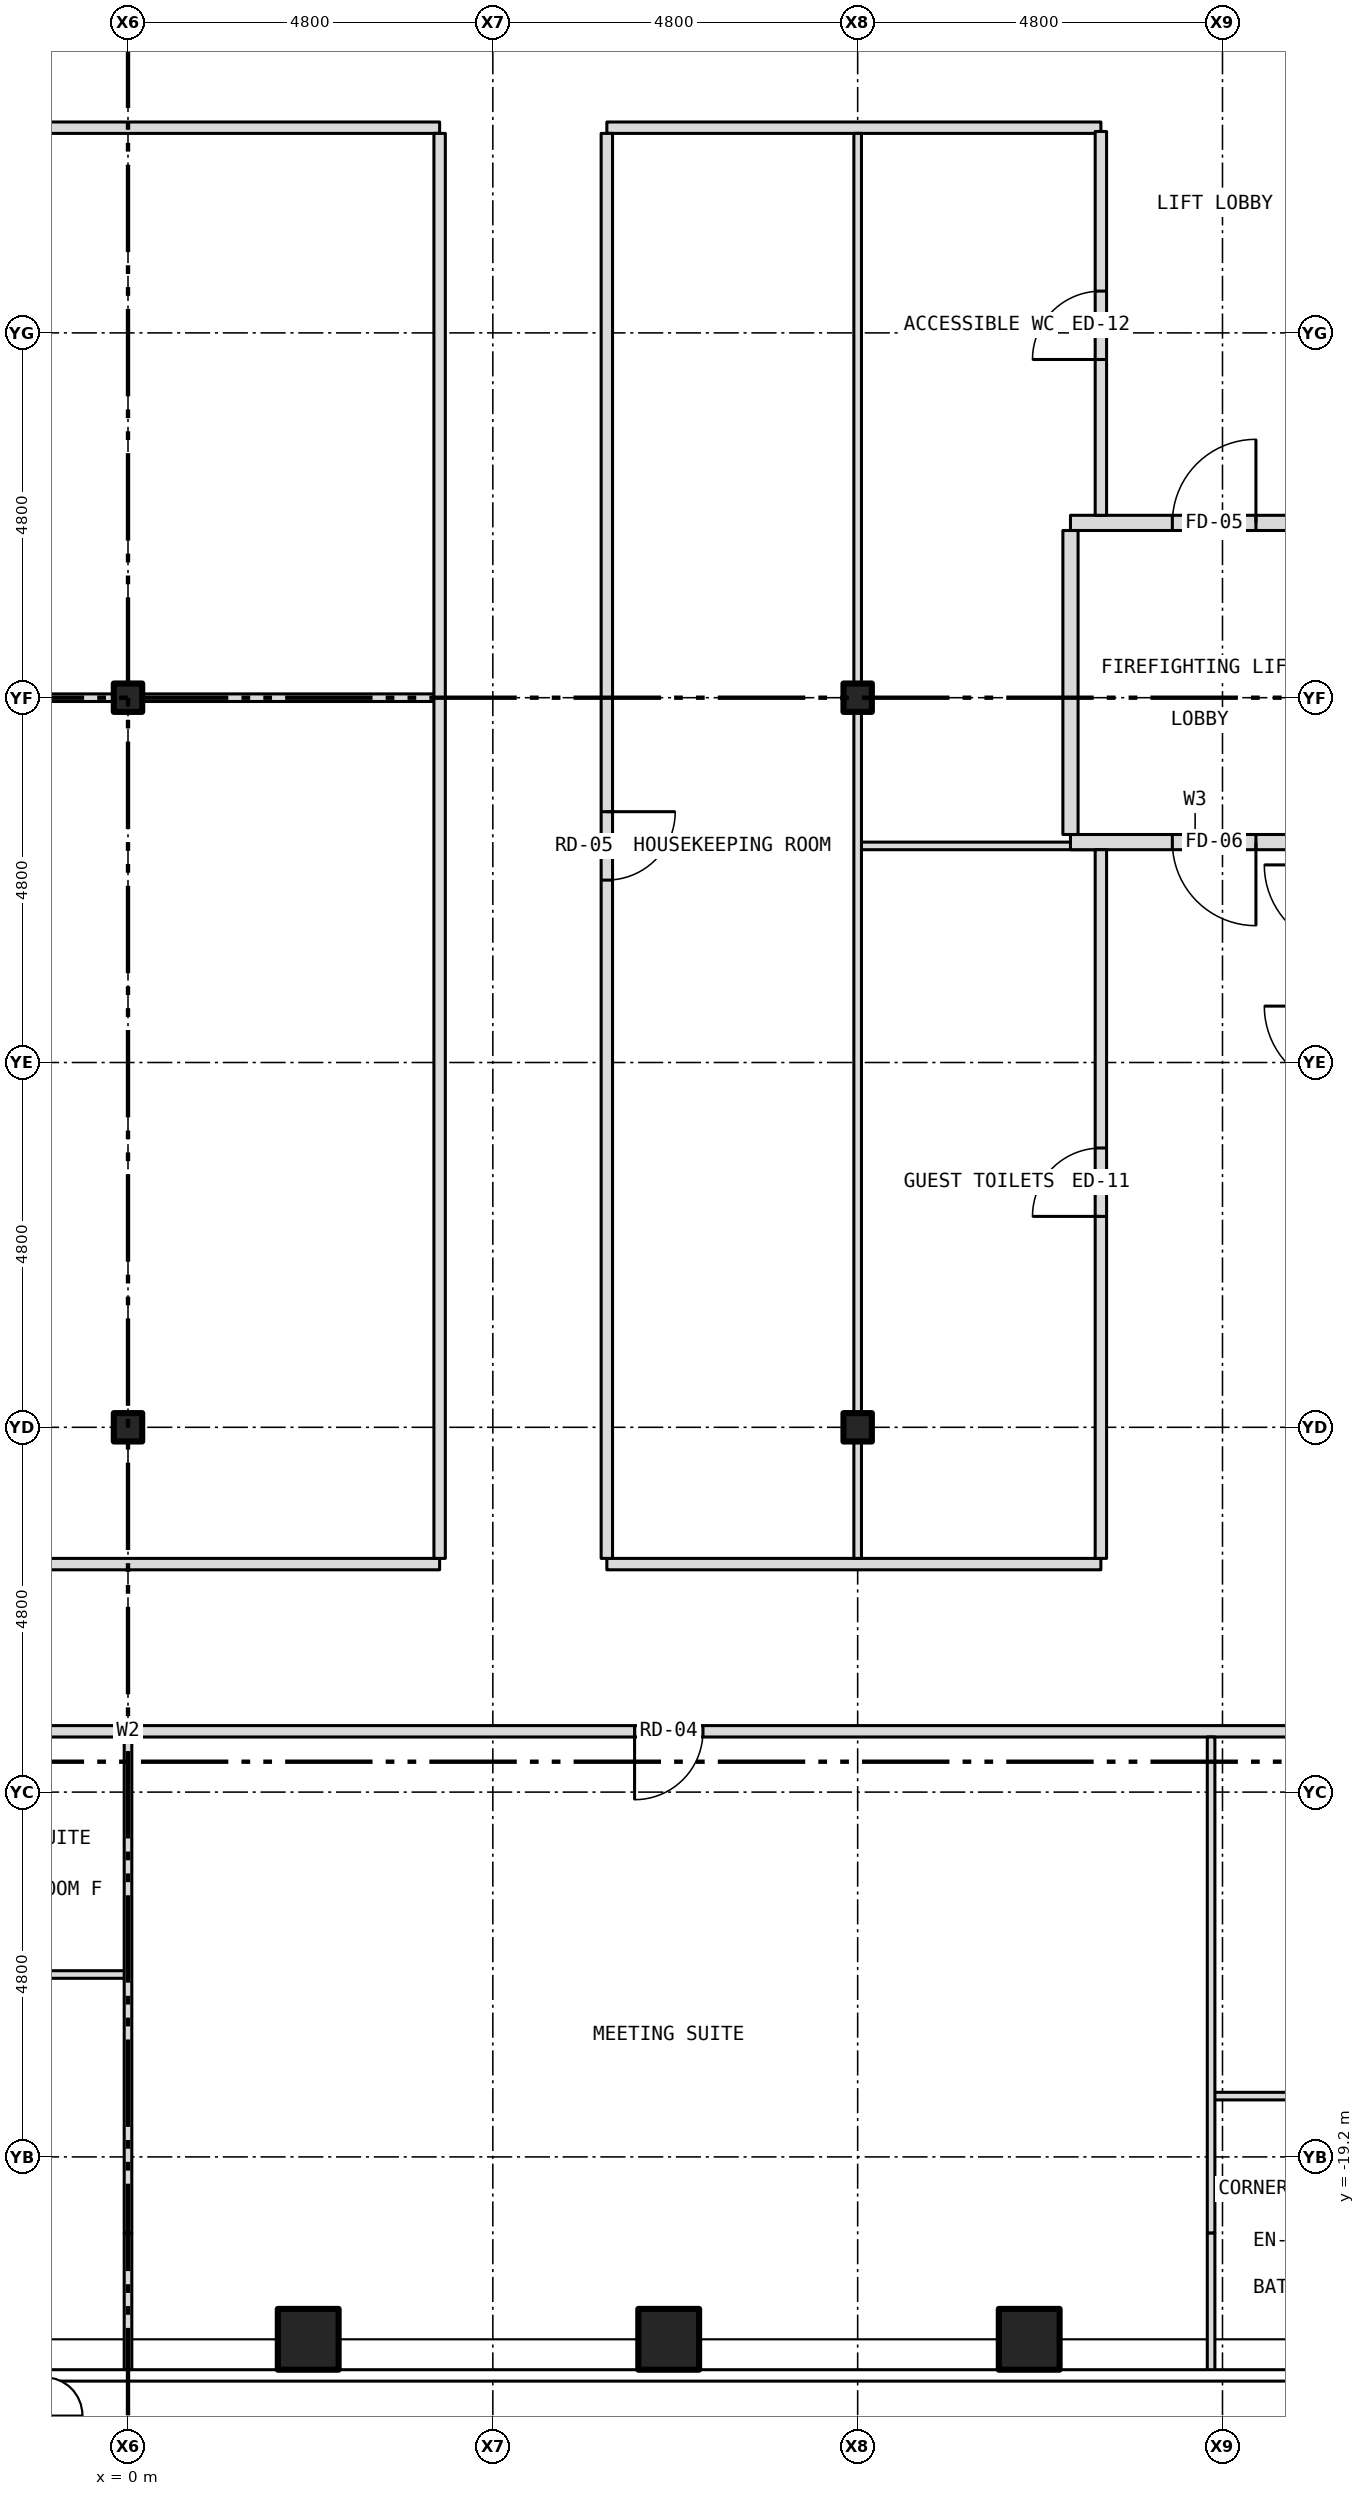
"""IFC4 building model, lengths in metres.
Left out: names, types, materials, properties, quantities, classifications, styles, units other than length and angle.
Written with IfcOpenShell. Run it as: python <this file> out.ifc"""

import sys

from ifc_helpers import new_model, si_unit, direction, frame, frame_2d, origin, origin_2d, place, context, subcontext, project, spatial, rectangle, hollow_rectangle, i_section, extrude, element, fill, save


model = new_model("IFC4")
c1 = context("Model", 3, precision=1e-05, world=origin(), true_north=direction((0.0, 1.0)))
c2 = subcontext(c1, "Body", "Model", "MODEL_VIEW")
j1 = project(units=[si_unit("LENGTHUNIT", "METRE"), si_unit("PLANEANGLEUNIT", "RADIAN")], contexts=[c1])
p1 = place(None, origin())
s1 = spatial("IfcSite", under=j1, at=p1, CompositionType="ELEMENT")
p2 = place(p1, origin())
s2 = spatial("IfcBuilding", under=s1, at=p2, CompositionType="ELEMENT")
p3 = place(p2, frame((0.0, 0.0, 183.0)))
s3 = spatial("IfcBuildingStorey", under=s2, at=p3, CompositionType="ELEMENT", Elevation=183.0)
for number, where, z_axis, x_axis in (
    (1, (2.371, -21.6, -0.15), (0.0, 0.0, 1.0), (1.0, 0.0, 0.0)),
    (2, (7.114, -21.6, -0.15), (0.0, 0.0, 1.0), (1.0, 0.0, 0.0)),
    (3, (11.857, -21.6, -0.15), (0.0, 0.0, 1.0), (1.0, 0.0, 0.0)),
):
    element("IfcColumn", number, at=place(p3, frame(where, z_axis=z_axis, x_axis=x_axis)), inside=s3, PredefinedType="COLUMN", context=c2, shape_type="SweptSolid", body=[
        extrude(hollow_rectangle(XDim=0.8, YDim=0.8, WallThickness=0.045, at=origin_2d()), origin(), (0.0, 0.0, 1.0), 3.35),
    ])
for number, where, z_axis, x_axis in (
    (4, (0.0, -9.6, -0.15), (0.0, 0.0, 1.0), (1.0, 0.0, 0.0)),
    (5, (0.0, 0.0, -0.15), (0.0, 0.0, 1.0), (1.0, 0.0, 0.0)),
    (6, (9.6, -9.6, -0.15), (0.0, 0.0, 1.0), (1.0, 0.0, 0.0)),
    (7, (9.6, 0.0, -0.15), (0.0, 0.0, 1.0), (1.0, 0.0, 0.0)),
):
    element("IfcColumn", number, at=place(p3, frame(where, z_axis=z_axis, x_axis=x_axis)), inside=s3, PredefinedType="COLUMN", context=c2, shape_type="SweptSolid", body=[
        extrude(i_section(OverallWidth=0.373, OverallDepth=0.373, WebThickness=0.016, FlangeThickness=0.026, at=origin_2d()), origin(), (0.0, 0.0, 1.0), 3.35),
    ])
p4 = place(p3, frame((14.25, -18.4, 0.0), z_axis=(0.0, 0.0, 1.0), x_axis=(1.0, 0.0, 0.0)))
e8 = element("IfcWall", 8, at=p4, inside=s3, PredefinedType="PARTITIONING", context=c2, shape_type="SweptSolid", body=[
    extrude(rectangle(XDim=2.78, YDim=0.1, at=frame_2d((1.39, 0.0))), origin(), (0.0, 0.0, 1.0), 3.2),
])
p5 = place(p4, frame((1.189, 0.0, 0.0)))
e9 = element("IfcOpeningElement", 9, at=p5, cuts=e8, PredefinedType="OPENING", context=c2, shape_type="SweptSolid", body=[
    extrude(rectangle(XDim=0.9, YDim=2.1, at=frame_2d((0.45, 1.05))), frame((0.0, 0.062, 0.0), z_axis=(0.0, -1.0, 0.0), x_axis=(1.0, 0.0, 0.0)), (0.0, 0.0, 1.0), 0.124),
])
p6 = place(p3, frame((-2.2, -16.8, 0.0), z_axis=(0.0, 0.0, 1.0), x_axis=(1.0, 0.0, 0.0)))
e10 = element("IfcWall", 10, at=p6, inside=s3, PredefinedType="PARTITIONING", context=c2, shape_type="SweptSolid", body=[
    extrude(rectangle(XDim=2.2, YDim=0.1, at=frame_2d((1.1, 0.0))), origin(), (0.0, 0.0, 1.0), 3.2),
])
p7 = place(p3, frame((-15.8, -13.6, 0.0), z_axis=(0.0, 0.0, 1.0), x_axis=(1.0, 0.0, 0.0)))
e11 = element("IfcWall", 11, at=p7, inside=s3, PredefinedType="PARTITIONING", context=c2, shape_type="SweptSolid", body=[
    extrude(rectangle(XDim=31.6, YDim=0.15, at=frame_2d((15.8, 0.0))), origin(), (0.0, 0.0, 1.0), 3.2),
])
p8 = place(p7, frame((3.529, 0.0, 0.0)))
e12 = element("IfcOpeningElement", 12, at=p8, cuts=e11, PredefinedType="OPENING", context=c2, shape_type="SweptSolid", body=[
    extrude(rectangle(XDim=1.0, YDim=2.1, at=frame_2d((0.5, 1.05))), frame((0.0, 0.087, 0.0), z_axis=(0.0, -1.0, 0.0), x_axis=(1.0, 0.0, 0.0)), (0.0, 0.0, 1.0), 0.174),
])
p9 = place(p7, frame((10.643, 0.0, 0.0)))
e13 = element("IfcOpeningElement", 13, at=p9, cuts=e11, PredefinedType="OPENING", context=c2, shape_type="SweptSolid", body=[
    extrude(rectangle(XDim=1.0, YDim=2.1, at=frame_2d((0.5, 1.05))), frame((0.0, 0.087, 0.0), z_axis=(0.0, -1.0, 0.0), x_axis=(1.0, 0.0, 0.0)), (0.0, 0.0, 1.0), 0.174),
])
p10 = place(p7, frame((22.465, 0.0, 0.0)))
e14 = element("IfcOpeningElement", 14, at=p10, cuts=e11, PredefinedType="OPENING", context=c2, shape_type="SweptSolid", body=[
    extrude(rectangle(XDim=0.9, YDim=2.1, at=frame_2d((0.45, 1.05))), frame((0.0, 0.087, 0.0), z_axis=(0.0, -1.0, 0.0), x_axis=(1.0, 0.0, 0.0)), (0.0, 0.0, 1.0), 0.174),
])
p11 = place(p3, frame((-12.8, -11.4, 0.0), z_axis=(0.0, 0.0, 1.0), x_axis=(1.0, 0.0, 0.0)))
e15 = element("IfcWall", 15, at=p11, inside=s3, PredefinedType="PARTITIONING", context=c2, shape_type="SweptSolid", body=[
    extrude(rectangle(XDim=16.9, YDim=0.15, at=frame_2d((8.45, 0.0))), origin(), (0.0, 0.0, 1.0), 3.2),
])
p12 = place(p11, frame((8.0, 0.0, 0.0)))
e16 = element("IfcOpeningElement", 16, at=p12, cuts=e15, PredefinedType="OPENING", context=c2, shape_type="SweptSolid", body=[
    extrude(rectangle(XDim=0.9, YDim=2.1, at=frame_2d((0.45, 1.05))), frame((0.0, 0.087, 0.0), z_axis=(0.0, -1.0, 0.0), x_axis=(1.0, 0.0, 0.0)), (0.0, 0.0, 1.0), 0.174),
])
p13 = place(p3, frame((6.3, -11.4, 0.0), z_axis=(0.0, 0.0, 1.0), x_axis=(1.0, 0.0, 0.0)))
e17 = element("IfcWall", 17, at=p13, inside=s3, PredefinedType="PARTITIONING", context=c2, shape_type="SweptSolid", body=[
    extrude(rectangle(XDim=6.5, YDim=0.15, at=frame_2d((3.25, 0.0))), origin(), (0.0, 0.0, 1.0), 3.2),
])
p14 = place(p3, frame((9.6, -1.95, 0.0), z_axis=(0.0, 0.0, 1.0), x_axis=(1.0, 0.0, 0.0)))
e18 = element("IfcWall", 18, at=p14, inside=s3, PredefinedType="PARTITIONING", context=c2, shape_type="SweptSolid", body=[
    extrude(rectangle(XDim=3.2, YDim=0.1, at=frame_2d((1.6, 0.0))), origin(), (0.0, 0.0, 1.0), 3.2),
])
p15 = place(p3, frame((12.4, -1.9, 0.0), z_axis=(0.0, 0.0, 1.0), x_axis=(1.0, 0.0, 0.0)))
e19 = element("IfcWall", 19, at=p15, inside=s3, PredefinedType="PARTITIONING", context=c2, shape_type="SweptSolid", body=[
    extrude(rectangle(XDim=3.28, YDim=0.2, at=frame_2d((1.64, 0.0))), origin(), (0.0, 0.0, 1.0), 3.2),
])
p16 = place(p15, frame((1.34, 0.0, 0.0)))
e20 = element("IfcOpeningElement", 20, at=p16, cuts=e19, PredefinedType="OPENING", context=c2, shape_type="SweptSolid", body=[
    extrude(rectangle(XDim=1.1, YDim=2.1, at=frame_2d((0.55, 1.05))), frame((0.0, 0.112, 0.0), z_axis=(0.0, -1.0, 0.0), x_axis=(1.0, 0.0, 0.0)), (0.0, 0.0, 1.0), 0.224),
])
p17 = place(p3, frame((-9.413, 0.0, 0.0), z_axis=(0.0, 0.0, 1.0), x_axis=(1.0, 0.0, 0.0)))
e21 = element("IfcWall", 21, at=p17, inside=s3, PredefinedType="PARTITIONING", context=c2, shape_type="SweptSolid", body=[
    extrude(rectangle(XDim=9.226, YDim=0.1, at=frame_2d((4.613, 0.0))), origin(), (0.0, 0.0, 1.0), 2.578),
])
p18 = place(p3, frame((-0.187, 0.0, 0.0), z_axis=(0.0, 0.0, 1.0), x_axis=(1.0, 0.0, 0.0)))
e22 = element("IfcWall", 22, at=p18, inside=s3, PredefinedType="PARTITIONING", context=c2, shape_type="SweptSolid", body=[
    extrude(rectangle(XDim=0.374, YDim=0.1, at=frame_2d((0.187, 0.0))), origin(), (0.0, 0.0, 1.0), 3.2),
])
p19 = place(p3, frame((0.187, 0.0, 0.0), z_axis=(0.0, 0.0, 1.0), x_axis=(1.0, 0.0, 0.0)))
e23 = element("IfcWall", 23, at=p19, inside=s3, PredefinedType="PARTITIONING", context=c2, shape_type="SweptSolid", body=[
    extrude(rectangle(XDim=3.913, YDim=0.1, at=frame_2d((1.957, 0.0))), origin(), (0.0, 0.0, 1.0), 2.578),
])
p20 = place(p3, frame((12.4, 2.3, 0.0), z_axis=(0.0, 0.0, 1.0), x_axis=(1.0, 0.0, 0.0)))
e24 = element("IfcWall", 24, at=p20, inside=s3, PredefinedType="PARTITIONING", context=c2, shape_type="SweptSolid", body=[
    extrude(rectangle(XDim=3.28, YDim=0.2, at=frame_2d((1.64, 0.0))), origin(), (0.0, 0.0, 1.0), 3.2),
])
p21 = place(p20, frame((1.34, 0.0, 0.0)))
e25 = element("IfcOpeningElement", 25, at=p21, cuts=e24, PredefinedType="OPENING", context=c2, shape_type="SweptSolid", body=[
    extrude(rectangle(XDim=1.1, YDim=2.1, at=frame_2d((0.55, 1.05))), frame((0.0, 0.112, 0.0), z_axis=(0.0, -1.0, 0.0), x_axis=(1.0, 0.0, 0.0)), (0.0, 0.0, 1.0), 0.224),
])
p22 = place(p3, frame((-12.8, 7.5, 0.0), z_axis=(0.0, 0.0, 1.0), x_axis=(1.0, 0.0, 0.0)))
e26 = element("IfcWall", 26, at=p22, inside=s3, PredefinedType="PARTITIONING", context=c2, shape_type="SweptSolid", body=[
    extrude(rectangle(XDim=16.9, YDim=0.15, at=frame_2d((8.45, 0.0))), origin(), (0.0, 0.0, 1.0), 3.2),
])
p23 = place(p22, frame((8.0, 0.0, 0.0)))
e27 = element("IfcOpeningElement", 27, at=p23, cuts=e26, PredefinedType="OPENING", context=c2, shape_type="SweptSolid", body=[
    extrude(rectangle(XDim=0.9, YDim=2.1, at=frame_2d((0.45, 1.05))), frame((0.0, 0.087, 0.0), z_axis=(0.0, -1.0, 0.0), x_axis=(1.0, 0.0, 0.0)), (0.0, 0.0, 1.0), 0.174),
])
p24 = place(p3, frame((6.3, 7.5, 0.0), z_axis=(0.0, 0.0, 1.0), x_axis=(1.0, 0.0, 0.0)))
e28 = element("IfcWall", 28, at=p24, inside=s3, PredefinedType="PARTITIONING", context=c2, shape_type="SweptSolid", body=[
    extrude(rectangle(XDim=6.5, YDim=0.15, at=frame_2d((3.25, 0.0))), origin(), (0.0, 0.0, 1.0), 3.2),
])
p25 = place(p3, frame((0.0, -22.03, 0.0), z_axis=(0.0, 0.0, 1.0), x_axis=(0.0, 1.0, 0.0)))
e29 = element("IfcWall", 29, at=p25, inside=s3, PredefinedType="PARTITIONING", context=c2, shape_type="SweptSolid", body=[
    extrude(rectangle(XDim=1.831, YDim=0.1, at=frame_2d((0.915, 0.0))), origin(), (0.0, 0.0, 1.0), 3.2),
])
p26 = place(p3, frame((0.0, -20.2, 0.0), z_axis=(0.0, 0.0, 1.0), x_axis=(0.0, 1.0, 0.0)))
e30 = element("IfcWall", 30, at=p26, inside=s3, PredefinedType="PARTITIONING", context=c2, shape_type="SweptSolid", body=[
    extrude(rectangle(XDim=6.525, YDim=0.1, at=frame_2d((3.262, 0.0))), origin(), (0.0, 0.0, 1.0), 2.578),
])
p27 = place(p3, frame((4.1, -11.325, 0.0), z_axis=(0.0, 0.0, 1.0), x_axis=(0.0, 1.0, 0.0)))
e31 = element("IfcWall", 31, at=p27, inside=s3, PredefinedType="PARTITIONING", context=c2, shape_type="SweptSolid", body=[
    extrude(rectangle(XDim=18.75, YDim=0.15, at=frame_2d((9.375, 0.0))), origin(), (0.0, 0.0, 1.0), 3.2),
])
p28 = place(p3, frame((6.3, -11.325, 0.0), z_axis=(0.0, 0.0, 1.0), x_axis=(0.0, 1.0, 0.0)))
e32 = element("IfcWall", 32, at=p28, inside=s3, PredefinedType="PARTITIONING", context=c2, shape_type="SweptSolid", body=[
    extrude(rectangle(XDim=18.75, YDim=0.15, at=frame_2d((9.375, 0.0))), origin(), (0.0, 0.0, 1.0), 3.2),
])
p29 = place(p28, frame((8.925, 0.0, 0.0)))
e33 = element("IfcOpeningElement", 33, at=p29, cuts=e32, PredefinedType="OPENING", context=c2, shape_type="SweptSolid", body=[
    extrude(rectangle(XDim=0.9, YDim=2.1, at=frame_2d((0.45, 1.05))), frame((0.0, 0.087, 0.0), z_axis=(0.0, -1.0, 0.0), x_axis=(1.0, 0.0, 0.0)), (0.0, 0.0, 1.0), 0.174),
])
p30 = place(p3, frame((9.6, -11.325, 0.0), z_axis=(0.0, 0.0, 1.0), x_axis=(0.0, 1.0, 0.0)))
e34 = element("IfcWall", 34, at=p30, inside=s3, PredefinedType="PARTITIONING", context=c2, shape_type="SweptSolid", body=[
    extrude(rectangle(XDim=1.538, YDim=0.1, at=frame_2d((0.769, 0.0))), origin(), (0.0, 0.0, 1.0), 2.578),
])
p31 = place(p3, frame((9.6, -9.787, 0.0), z_axis=(0.0, 0.0, 1.0), x_axis=(0.0, 1.0, 0.0)))
e35 = element("IfcWall", 35, at=p31, inside=s3, PredefinedType="PARTITIONING", context=c2, shape_type="SweptSolid", body=[
    extrude(rectangle(XDim=0.374, YDim=0.1, at=frame_2d((0.187, 0.0))), origin(), (0.0, 0.0, 1.0), 3.2),
])
p32 = place(p3, frame((9.6, -9.413, 0.0), z_axis=(0.0, 0.0, 1.0), x_axis=(0.0, 1.0, 0.0)))
e36 = element("IfcWall", 36, at=p32, inside=s3, PredefinedType="PARTITIONING", context=c2, shape_type="SweptSolid", body=[
    extrude(rectangle(XDim=9.226, YDim=0.1, at=frame_2d((4.613, 0.0))), origin(), (0.0, 0.0, 1.0), 2.578),
])
p33 = place(p3, frame((9.6, -0.187, 0.0), z_axis=(0.0, 0.0, 1.0), x_axis=(0.0, 1.0, 0.0)))
e37 = element("IfcWall", 37, at=p33, inside=s3, PredefinedType="PARTITIONING", context=c2, shape_type="SweptSolid", body=[
    extrude(rectangle(XDim=0.374, YDim=0.1, at=frame_2d((0.187, 0.0))), origin(), (0.0, 0.0, 1.0), 3.2),
])
p34 = place(p3, frame((9.6, 0.187, 0.0), z_axis=(0.0, 0.0, 1.0), x_axis=(0.0, 1.0, 0.0)))
e38 = element("IfcWall", 38, at=p34, inside=s3, PredefinedType="PARTITIONING", context=c2, shape_type="SweptSolid", body=[
    extrude(rectangle(XDim=7.238, YDim=0.1, at=frame_2d((3.619, 0.0))), origin(), (0.0, 0.0, 1.0), 2.578),
])
p35 = place(p3, frame((12.4, -1.8, 0.0), z_axis=(0.0, 0.0, 1.0), x_axis=(0.0, 1.0, 0.0)))
e39 = element("IfcWall", 39, at=p35, inside=s3, PredefinedType="PARTITIONING", context=c2, shape_type="SweptSolid", body=[
    extrude(rectangle(XDim=4.0, YDim=0.2, at=frame_2d((2.0, 0.0))), origin(), (0.0, 0.0, 1.0), 3.2),
])
p36 = place(p3, frame((12.8, -11.325, 0.0), z_axis=(0.0, 0.0, 1.0), x_axis=(0.0, 1.0, 0.0)))
e40 = element("IfcWall", 40, at=p36, inside=s3, PredefinedType="PARTITIONING", context=c2, shape_type="SweptSolid", body=[
    extrude(rectangle(XDim=9.325, YDim=0.15, at=frame_2d((4.663, 0.0))), origin(), (0.0, 0.0, 1.0), 3.2),
])
p37 = place(p36, frame((4.5, 0.0, 0.0)))
e41 = element("IfcOpeningElement", 41, at=p37, cuts=e40, PredefinedType="OPENING", context=c2, shape_type="SweptSolid", body=[
    extrude(rectangle(XDim=0.9, YDim=2.1, at=frame_2d((0.45, 1.05))), frame((0.0, 0.087, 0.0), z_axis=(0.0, -1.0, 0.0), x_axis=(1.0, 0.0, 0.0)), (0.0, 0.0, 1.0), 0.174),
])
p38 = place(p3, frame((12.8, 2.4, 0.0), z_axis=(0.0, 0.0, 1.0), x_axis=(0.0, 1.0, 0.0)))
e42 = element("IfcWall", 42, at=p38, inside=s3, PredefinedType="PARTITIONING", context=c2, shape_type="SweptSolid", body=[
    extrude(rectangle(XDim=5.05, YDim=0.15, at=frame_2d((2.525, 0.0))), origin(), (0.0, 0.0, 1.0), 3.2),
])
p39 = place(p38, frame((2.05, 0.0, 0.0)))
e43 = element("IfcOpeningElement", 43, at=p39, cuts=e42, PredefinedType="OPENING", context=c2, shape_type="SweptSolid", body=[
    extrude(rectangle(XDim=0.9, YDim=2.1, at=frame_2d((0.45, 1.05))), frame((0.0, 0.087, 0.0), z_axis=(0.0, -1.0, 0.0), x_axis=(1.0, 0.0, 0.0)), (0.0, 0.0, 1.0), 0.174),
])
p40 = place(p3, frame((14.25, -22.03, 0.0), z_axis=(0.0, 0.0, 1.0), x_axis=(0.0, 1.0, 0.0)))
e44 = element("IfcWall", 44, at=p40, inside=s3, PredefinedType="PARTITIONING", context=c2, shape_type="SweptSolid", body=[
    extrude(rectangle(XDim=1.831, YDim=0.1, at=frame_2d((0.915, 0.0))), origin(), (0.0, 0.0, 1.0), 3.2),
])
p41 = place(p3, frame((14.25, -20.2, 0.0), z_axis=(0.0, 0.0, 1.0), x_axis=(0.0, 1.0, 0.0)))
e45 = element("IfcWall", 45, at=p41, inside=s3, PredefinedType="PARTITIONING", context=c2, shape_type="SweptSolid", body=[
    extrude(rectangle(XDim=6.525, YDim=0.1, at=frame_2d((3.262, 0.0))), origin(), (0.0, 0.0, 1.0), 2.667),
])
p42 = place(p21, origin())
e46 = element("IfcDoor", 46, at=p42, inside=s3, OperationType="SINGLE_SWING_RIGHT", PredefinedType="DOOR", context=c2, shape_type="SweptSolid", body=[
    extrude(rectangle(XDim=1.1, YDim=2.1, at=frame_2d((0.55, 1.05))), frame((0.0, 0.025, 0.0), z_axis=(0.0, -1.0, 0.0), x_axis=(1.0, 0.0, 0.0)), (0.0, 0.0, 1.0), 0.05),
])
fill(e25, e46)
p43 = place(p16, origin())
e47 = element("IfcDoor", 47, at=p43, inside=s3, OperationType="SINGLE_SWING_RIGHT", PredefinedType="DOOR", context=c2, shape_type="SweptSolid", body=[
    extrude(rectangle(XDim=1.1, YDim=2.1, at=frame_2d((0.55, 1.05))), frame((0.0, 0.025, 0.0), z_axis=(0.0, -1.0, 0.0), x_axis=(1.0, 0.0, 0.0)), (0.0, 0.0, 1.0), 0.05),
])
fill(e20, e47)
p44 = place(p10, origin())
e48 = element("IfcDoor", 48, at=p44, inside=s3, OperationType="SINGLE_SWING_LEFT", PredefinedType="DOOR", context=c2, shape_type="SweptSolid", body=[
    extrude(rectangle(XDim=0.9, YDim=2.1, at=frame_2d((0.45, 1.05))), frame((0.0, 0.025, 0.0), z_axis=(0.0, -1.0, 0.0), x_axis=(1.0, 0.0, 0.0)), (0.0, 0.0, 1.0), 0.05),
])
fill(e14, e48)
p45 = place(p37, origin())
e49 = element("IfcDoor", 49, at=p45, inside=s3, OperationType="SINGLE_SWING_LEFT", PredefinedType="DOOR", context=c2, shape_type="SweptSolid", body=[
    extrude(rectangle(XDim=0.9, YDim=2.1, at=frame_2d((0.45, 1.05))), frame((0.0, 0.025, 0.0), z_axis=(0.0, -1.0, 0.0), x_axis=(1.0, 0.0, 0.0)), (0.0, 0.0, 1.0), 0.05),
])
fill(e41, e49)
p46 = place(p39, origin())
e50 = element("IfcDoor", 50, at=p46, inside=s3, OperationType="SINGLE_SWING_LEFT", PredefinedType="DOOR", context=c2, shape_type="SweptSolid", body=[
    extrude(rectangle(XDim=0.9, YDim=2.1, at=frame_2d((0.45, 1.05))), frame((0.0, 0.025, 0.0), z_axis=(0.0, -1.0, 0.0), x_axis=(1.0, 0.0, 0.0)), (0.0, 0.0, 1.0), 0.05),
])
fill(e43, e50)
p47 = place(p29, origin())
e51 = element("IfcDoor", 51, at=p47, inside=s3, OperationType="SINGLE_SWING_RIGHT", PredefinedType="DOOR", context=c2, shape_type="SweptSolid", body=[
    extrude(rectangle(XDim=0.9, YDim=2.1, at=frame_2d((0.45, 1.05))), frame((0.0, 0.025, 0.0), z_axis=(0.0, -1.0, 0.0), x_axis=(1.0, 0.0, 0.0)), (0.0, 0.0, 1.0), 0.05),
])
fill(e33, e51)
save(model, sys.argv[1])
